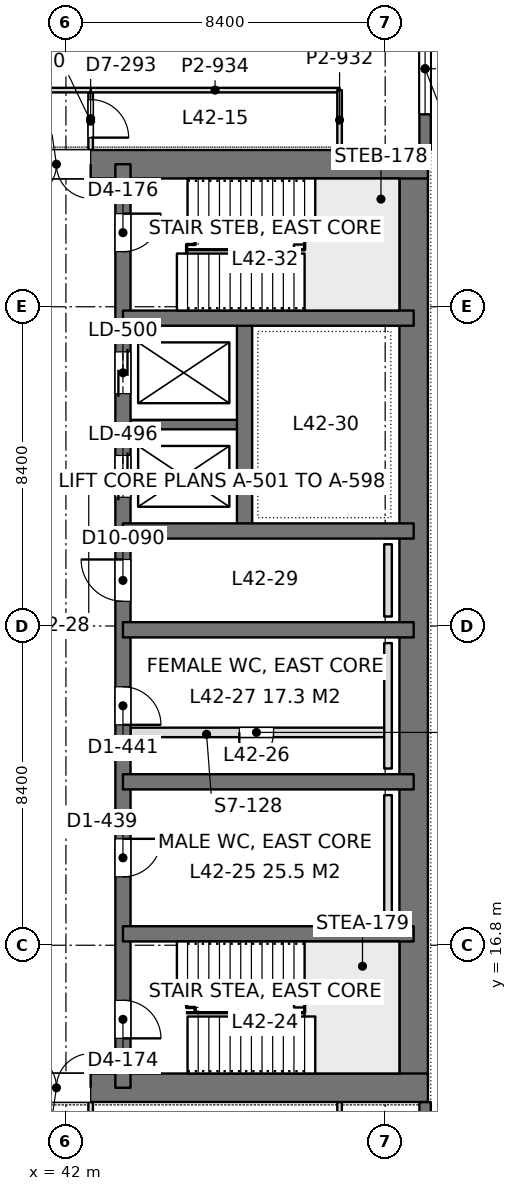
"""IFC4 building model, lengths in metres.
Left out: names, types, materials, properties, quantities, classifications, styles, units other than length and angle.
Written with IfcOpenShell. Run it as: python <this file> out.ifc"""

import sys

from ifc_helpers import new_model, si_unit, direction, frame, frame_2d, origin, place, context, subcontext, project, spatial, rectangle, extrude, element, fill, save


model = new_model("IFC4")
c1 = context("Model", 3, precision=1e-05, world=origin(), true_north=direction((0.0, 1.0)))
c2 = subcontext(c1, "Body", "Model", "MODEL_VIEW")
j1 = project(units=[si_unit("LENGTHUNIT", "METRE"), si_unit("PLANEANGLEUNIT", "RADIAN")], contexts=[c1])
p1 = place(None, origin())
s1 = spatial("IfcSite", under=j1, at=p1, CompositionType="ELEMENT")
p2 = place(p1, origin())
s2 = spatial("IfcBuilding", under=s1, at=p2, CompositionType="ELEMENT")
p3 = place(p2, frame((0.0, 0.0, 186.0)))
s3 = spatial("IfcBuildingStorey", under=s2, at=p3, CompositionType="ELEMENT", Elevation=186.0)
p4 = place(p3, frame((33.675, 13.05, 0.0), z_axis=(0.0, 0.0, 1.0), x_axis=(1.0, 0.0, 0.0)))
e1 = element("IfcWall", 1, at=p4, inside=s3, PredefinedType="SHEAR", context=c2, shape_type="SweptSolid", body=[
    extrude(rectangle(XDim=17.85, YDim=0.75, at=frame_2d((8.925, 0.0))), origin(), (0.0, 0.0, 1.0), 4.2),
])
p5 = place(p4, frame((7.175, 0.0, 0.0)))
e2 = element("IfcOpeningElement", 2, at=p5, cuts=e1, PredefinedType="OPENING", context=c2, shape_type="SweptSolid", body=[
    extrude(rectangle(XDim=1.8, YDim=2.4, at=frame_2d((0.9, 1.2))), frame((0.0, 0.385, 0.0), z_axis=(0.0, -1.0, 0.0), x_axis=(1.0, 0.0, 0.0)), (0.0, 0.0, 1.0), 0.77),
])
p6 = place(p3, frame((33.675, 37.35, 0.0), z_axis=(0.0, 0.0, 1.0), x_axis=(1.0, 0.0, 0.0)))
e3 = element("IfcWall", 3, at=p6, inside=s3, PredefinedType="SHEAR", context=c2, shape_type="SweptSolid", body=[
    extrude(rectangle(XDim=17.85, YDim=0.75, at=frame_2d((8.925, 0.0))), origin(), (0.0, 0.0, 1.0), 4.2),
])
p7 = place(p6, frame((7.175, 0.0, 0.0)))
e4 = element("IfcOpeningElement", 4, at=p7, cuts=e3, PredefinedType="OPENING", context=c2, shape_type="SweptSolid", body=[
    extrude(rectangle(XDim=1.8, YDim=2.4, at=frame_2d((0.9, 1.2))), frame((0.0, 0.385, 0.0), z_axis=(0.0, -1.0, 0.0), x_axis=(1.0, 0.0, 0.0)), (0.0, 0.0, 1.0), 0.77),
])
p8 = place(p3, frame((51.15, 13.05, 0.0), z_axis=(0.0, 0.0, 1.0), x_axis=(0.0, 1.0, 0.0)))
e5 = element("IfcWall", 5, at=p8, inside=s3, PredefinedType="SHEAR", context=c2, shape_type="SweptSolid", body=[
    extrude(rectangle(XDim=24.3, YDim=0.75, at=frame_2d((12.15, 0.0))), origin(), (0.0, 0.0, 1.0), 4.2),
])
p9 = place(p3, frame((43.5, 13.05, 0.0), z_axis=(0.0, 0.0, 1.0), x_axis=(0.0, 1.0, 0.0)))
e6 = element("IfcWall", 6, at=p9, inside=s3, PredefinedType="SHEAR", context=c2, shape_type="SweptSolid", body=[
    extrude(rectangle(XDim=24.3, YDim=0.4, at=frame_2d((12.15, 0.0))), origin(), (0.0, 0.0, 1.0), 4.2),
])
p10 = place(p9, frame((1.3, 0.0, 0.0)))
e7 = element("IfcOpeningElement", 7, at=p10, cuts=e6, PredefinedType="OPENING", context=c2, shape_type="SweptSolid", body=[
    extrude(rectangle(XDim=1.0, YDim=2.2, at=frame_2d((0.5, 1.1))), frame((0.0, 0.21, 0.0), z_axis=(0.0, -1.0, 0.0), x_axis=(1.0, 0.0, 0.0)), (0.0, 0.0, 1.0), 0.42),
])
p11 = place(p9, frame((22.0, 0.0, 0.0)))
e8 = element("IfcOpeningElement", 8, at=p11, cuts=e6, PredefinedType="OPENING", context=c2, shape_type="SweptSolid", body=[
    extrude(rectangle(XDim=1.0, YDim=2.2, at=frame_2d((0.5, 1.1))), frame((0.0, 0.21, 0.0), z_axis=(0.0, -1.0, 0.0), x_axis=(1.0, 0.0, 0.0)), (0.0, 0.0, 1.0), 0.42),
])
p12 = place(p9, frame((5.55, 0.0, 0.0)))
e9 = element("IfcOpeningElement", 9, at=p12, cuts=e6, PredefinedType="OPENING", context=c2, shape_type="SweptSolid", body=[
    extrude(rectangle(XDim=1.0, YDim=2.2, at=frame_2d((0.5, 1.1))), frame((0.0, 0.21, 0.0), z_axis=(0.0, -1.0, 0.0), x_axis=(1.0, 0.0, 0.0)), (0.0, 0.0, 1.0), 0.42),
])
p13 = place(p9, frame((9.55, 0.0, 0.0)))
e10 = element("IfcOpeningElement", 10, at=p13, cuts=e6, PredefinedType="OPENING", context=c2, shape_type="SweptSolid", body=[
    extrude(rectangle(XDim=1.0, YDim=2.2, at=frame_2d((0.5, 1.1))), frame((0.0, 0.21, 0.0), z_axis=(0.0, -1.0, 0.0), x_axis=(1.0, 0.0, 0.0)), (0.0, 0.0, 1.0), 0.42),
])
p14 = place(p9, frame((12.8, 0.0, 0.0)))
e11 = element("IfcOpeningElement", 11, at=p14, cuts=e6, PredefinedType="OPENING", context=c2, shape_type="SweptSolid", body=[
    extrude(rectangle(XDim=1.1, YDim=2.2, at=frame_2d((0.55, 1.1))), frame((0.0, 0.21, 0.0), z_axis=(0.0, -1.0, 0.0), x_axis=(1.0, 0.0, 0.0)), (0.0, 0.0, 1.0), 0.42),
])
p15 = place(p9, frame((15.538, 0.0, 0.0)))
e12 = element("IfcOpeningElement", 12, at=p15, cuts=e6, PredefinedType="OPENING", context=c2, shape_type="SweptSolid", body=[
    extrude(rectangle(XDim=1.1, YDim=2.2, at=frame_2d((0.55, 1.1))), frame((0.0, 0.21, 0.0), z_axis=(0.0, -1.0, 0.0), x_axis=(1.0, 0.0, 0.0)), (0.0, 0.0, 1.0), 0.42),
])
p16 = place(p9, frame((18.262, 0.0, 0.0)))
e13 = element("IfcOpeningElement", 13, at=p16, cuts=e6, PredefinedType="OPENING", context=c2, shape_type="SweptSolid", body=[
    extrude(rectangle(XDim=1.1, YDim=2.2, at=frame_2d((0.55, 1.1))), frame((0.0, 0.21, 0.0), z_axis=(0.0, -1.0, 0.0), x_axis=(1.0, 0.0, 0.0)), (0.0, 0.0, 1.0), 0.42),
])
for number, where, z_axis, x_axis in (
    (14, (51.15, 17.1, 0.0), (0.0, 0.0, 1.0), (-1.0, 0.0, 0.0)),
    (15, (51.15, 21.1, 0.0), (0.0, 0.0, 1.0), (-1.0, 0.0, 0.0)),
    (16, (51.15, 25.1, 0.0), (0.0, 0.0, 1.0), (-1.0, 0.0, 0.0)),
    (17, (51.15, 27.7, 0.0), (0.0, 0.0, 1.0), (-1.0, 0.0, 0.0)),
    (18, (51.15, 33.3, 0.0), (0.0, 0.0, 1.0), (-1.0, 0.0, 0.0)),
):
    element("IfcWall", number, at=place(p3, frame(where, z_axis=z_axis, x_axis=x_axis)), inside=s3, PredefinedType="SHEAR", context=c2, shape_type="SweptSolid", body=[
        extrude(rectangle(XDim=7.65, YDim=0.4, at=frame_2d((3.825, 0.0))), origin(), (0.0, 0.0, 1.0), 4.2),
    ])
p17 = place(p3, frame((46.7, 27.7, 0.0), z_axis=(0.0, 0.0, 1.0), x_axis=(0.0, 1.0, 0.0)))
e19 = element("IfcWall", 19, at=p17, inside=s3, PredefinedType="SHEAR", context=c2, shape_type="SweptSolid", body=[
    extrude(rectangle(XDim=5.6, YDim=0.4, at=frame_2d((2.8, 0.0))), origin(), (0.0, 0.0, 1.0), 4.2),
])
p18 = place(p3, frame((46.7, 30.5, 0.0), z_axis=(0.0, 0.0, 1.0), x_axis=(-1.0, 0.0, 0.0)))
e20 = element("IfcWall", 20, at=p18, inside=s3, PredefinedType="SHEAR", context=c2, shape_type="SweptSolid", body=[
    extrude(rectangle(XDim=3.2, YDim=0.25, at=frame_2d((1.6, 0.0))), origin(), (0.0, 0.0, 1.0), 4.2),
])
p19 = place(p3, frame((51.45, 42.0, 0.0), z_axis=(0.0, 0.0, 1.0), x_axis=(0.0, -1.0, 0.0)))
e21 = element("IfcWall", 21, at=p19, inside=s3, PredefinedType="SOLIDWALL", context=c2, shape_type="SweptSolid", body=[
    extrude(rectangle(XDim=4.275, YDim=0.3, at=frame_2d((2.137, 0.0))), origin(), (0.0, 0.0, 1.0), 4.05),
])
p20 = place(p19, frame((0.938, 0.0, 0.9)))
e22 = element("IfcOpeningElement", 22, at=p20, cuts=e21, PredefinedType="OPENING", context=c2, shape_type="SweptSolid", body=[
    extrude(rectangle(XDim=2.4, YDim=1.9, at=frame_2d((1.2, 0.95))), frame((0.0, 0.16, 0.0), z_axis=(0.0, -1.0, 0.0), x_axis=(1.0, 0.0, 0.0)), (0.0, 0.0, 1.0), 0.32),
])
p21 = place(p3, frame((51.45, 12.675, 0.0), z_axis=(0.0, 0.0, 1.0), x_axis=(0.0, -1.0, 0.0)))
e23 = element("IfcWall", 23, at=p21, inside=s3, PredefinedType="SOLIDWALL", context=c2, shape_type="SweptSolid", body=[
    extrude(rectangle(XDim=4.275, YDim=0.3, at=frame_2d((2.138, 0.0))), origin(), (0.0, 0.0, 1.0), 4.05),
])
p22 = place(p21, frame((0.938, 0.0, 0.9)))
e24 = element("IfcOpeningElement", 24, at=p22, cuts=e23, PredefinedType="OPENING", context=c2, shape_type="SweptSolid", body=[
    extrude(rectangle(XDim=2.4, YDim=1.9, at=frame_2d((1.2, 0.95))), frame((0.0, 0.16, 0.0), z_axis=(0.0, -1.0, 0.0), x_axis=(1.0, 0.0, 0.0)), (0.0, 0.0, 1.0), 0.32),
])
p23 = place(p3, frame((42.65, 11.158, 0.0), z_axis=(0.0, 0.0, 1.0), x_axis=(0.0, 1.0, 0.0)))
e25 = element("IfcWall", 25, at=p23, inside=s3, PredefinedType="PARTITIONING", context=c2, shape_type="SweptSolid", body=[
    extrude(rectangle(XDim=1.518, YDim=0.12, at=frame_2d((0.759, 0.0))), origin(), (0.0, 0.0, 1.0), 4.05),
])
p24 = place(p23, frame((0.192, 0.0, 0.0)))
e26 = element("IfcOpeningElement", 26, at=p24, cuts=e25, PredefinedType="OPENING", context=c2, shape_type="SweptSolid", body=[
    extrude(rectangle(XDim=1.0, YDim=2.4, at=frame_2d((0.5, 1.2))), frame((0.0, 0.07, 0.0), z_axis=(0.0, -1.0, 0.0), x_axis=(1.0, 0.0, 0.0)), (0.0, 0.0, 1.0), 0.14),
])
p25 = place(p3, frame((49.2, 11.1, 0.0), z_axis=(0.0, 0.0, 1.0), x_axis=(0.0, 1.0, 0.0)))
e27 = element("IfcWall", 27, at=p25, inside=s3, PredefinedType="PARTITIONING", context=c2, shape_type="SweptSolid", body=[
    extrude(rectangle(XDim=1.576, YDim=0.12, at=frame_2d((0.788, 0.0))), origin(), (0.0, 0.0, 1.0), 4.05),
])
p26 = place(p3, frame((1.2, 39.3, 0.0), z_axis=(0.0, 0.0, 1.0), x_axis=(1.0, 0.0, 0.0)))
e28 = element("IfcWall", 28, at=p26, inside=s3, PredefinedType="PARTITIONING", context=c2, shape_type="SweptSolid", body=[
    extrude(rectangle(XDim=41.452, YDim=0.12, at=frame_2d((20.726, 0.0))), origin(), (0.0, 0.0, 1.0), 3.55),
])
p27 = place(p26, frame((12.917, 0.0, 0.0)))
e29 = element("IfcOpeningElement", 29, at=p27, cuts=e28, PredefinedType="OPENING", context=c2, shape_type="SweptSolid", body=[
    extrude(rectangle(XDim=1.8, YDim=2.2, at=frame_2d((0.9, 1.1))), frame((0.0, 0.07, 0.0), z_axis=(0.0, -1.0, 0.0), x_axis=(1.0, 0.0, 0.0)), (0.0, 0.0, 1.0), 0.14),
])
p28 = place(p26, frame((26.733, 0.0, 0.0)))
e30 = element("IfcOpeningElement", 30, at=p28, cuts=e28, PredefinedType="OPENING", context=c2, shape_type="SweptSolid", body=[
    extrude(rectangle(XDim=1.8, YDim=2.2, at=frame_2d((0.9, 1.1))), frame((0.0, 0.07, 0.0), z_axis=(0.0, -1.0, 0.0), x_axis=(1.0, 0.0, 0.0)), (0.0, 0.0, 1.0), 0.14),
])
p29 = place(p3, frame((42.65, 37.724, 0.0), z_axis=(0.0, 0.0, 1.0), x_axis=(0.0, 1.0, 0.0)))
e31 = element("IfcWall", 31, at=p29, inside=s3, PredefinedType="PARTITIONING", context=c2, shape_type="SweptSolid", body=[
    extrude(rectangle(XDim=1.518, YDim=0.12, at=frame_2d((0.759, 0.0))), origin(), (0.0, 0.0, 1.0), 4.05),
])
p30 = place(p29, frame((0.326, 0.0, 0.0)))
e32 = element("IfcOpeningElement", 32, at=p30, cuts=e31, PredefinedType="OPENING", context=c2, shape_type="SweptSolid", body=[
    extrude(rectangle(XDim=1.0, YDim=2.4, at=frame_2d((0.5, 1.2))), frame((0.0, 0.07, 0.0), z_axis=(0.0, -1.0, 0.0), x_axis=(1.0, 0.0, 0.0)), (0.0, 0.0, 1.0), 0.14),
])
p31 = place(p3, frame((42.648, 39.3, 0.0), z_axis=(0.0, 0.0, 1.0), x_axis=(1.0, 0.0, 0.0)))
e33 = element("IfcWall", 33, at=p31, inside=s3, PredefinedType="PARTITIONING", context=c2, shape_type="SweptSolid", body=[
    extrude(rectangle(XDim=6.552, YDim=0.12, at=frame_2d((3.276, 0.0))), origin(), (0.0, 0.0, 1.0), 3.69),
])
p32 = place(p3, frame((49.2, 37.724, 0.0), z_axis=(0.0, 0.0, 1.0), x_axis=(0.0, 1.0, 0.0)))
e34 = element("IfcWall", 34, at=p32, inside=s3, PredefinedType="PARTITIONING", context=c2, shape_type="SweptSolid", body=[
    extrude(rectangle(XDim=1.576, YDim=0.12, at=frame_2d((0.788, 0.0))), origin(), (0.0, 0.0, 1.0), 4.05),
])
p33 = place(p3, frame((43.7, 22.4, 0.0), z_axis=(0.0, 0.0, 1.0), x_axis=(1.0, 0.0, 0.0)))
e35 = element("IfcWall", 35, at=p33, inside=s3, PredefinedType="PARTITIONING", context=c2, shape_type="SweptSolid", body=[
    extrude(rectangle(XDim=6.675, YDim=0.25, at=frame_2d((3.337, 0.0))), origin(), (0.0, 0.0, 1.0), 4.0),
])
p34 = place(p33, frame((2.863, 0.0, 0.0)))
e36 = element("IfcOpeningElement", 36, at=p34, cuts=e35, PredefinedType="OPENING", context=c2, shape_type="SweptSolid", body=[
    extrude(rectangle(XDim=0.9, YDim=2.2, at=frame_2d((0.45, 1.1))), frame((0.0, 0.135, 0.0), z_axis=(0.0, -1.0, 0.0), x_axis=(1.0, 0.0, 0.0)), (0.0, 0.0, 1.0), 0.27),
])
for number, where, z_axis, x_axis in (
    (37, (50.475, 17.45, 0.0), (0.0, 0.0, 1.0), (0.0, 1.0, 0.0)),
    (38, (50.475, 21.45, 0.0), (0.0, 0.0, 1.0), (0.0, 1.0, 0.0)),
):
    element("IfcWall", number, at=place(p3, frame(where, z_axis=z_axis, x_axis=x_axis)), inside=s3, PredefinedType="PLUMBINGWALL", context=c2, shape_type="SweptSolid", body=[
        extrude(rectangle(XDim=3.3, YDim=0.2, at=frame_2d((1.65, 0.0))), origin(), (0.0, 0.0, 1.0), 1.2),
    ])
p35 = place(p3, frame((50.475, 25.45, 0.0), z_axis=(0.0, 0.0, 1.0), x_axis=(0.0, 1.0, 0.0)))
e39 = element("IfcWall", 39, at=p35, inside=s3, PredefinedType="PLUMBINGWALL", context=c2, shape_type="SweptSolid", body=[
    extrude(rectangle(XDim=1.9, YDim=0.2, at=frame_2d((0.95, 0.0))), origin(), (0.0, 0.0, 1.0), 1.2),
])
p36 = place(p20, origin())
e40 = element("IfcWindow", 40, at=p36, inside=s3, PartitioningType="SINGLE_PANEL", PredefinedType="WINDOW", context=c2, shape_type="SweptSolid", body=[
    extrude(rectangle(XDim=2.4, YDim=1.9, at=frame_2d((1.2, 0.95))), frame((0.0, 0.03, 0.0), z_axis=(0.0, -1.0, 0.0), x_axis=(1.0, 0.0, 0.0)), (0.0, 0.0, 1.0), 0.06),
])
fill(e22, e40)
p37 = place(p5, origin())
e41 = element("IfcDoor", 41, at=p37, inside=s3, OperationType="DOUBLE_DOOR_SINGLE_SWING", PredefinedType="DOOR", context=c2, shape_type="SweptSolid", body=[
    extrude(rectangle(XDim=1.8, YDim=2.4, at=frame_2d((0.9, 1.2))), frame((0.0, 0.025, 0.0), z_axis=(0.0, -1.0, 0.0), x_axis=(1.0, 0.0, 0.0)), (0.0, 0.0, 1.0), 0.05),
])
fill(e2, e41)
p38 = place(p7, frame((1.8, 0.0, 0.0), z_axis=(0.0, 0.0, 1.0), x_axis=(-1.0, 0.0, 0.0)))
e42 = element("IfcDoor", 42, at=p38, inside=s3, OperationType="DOUBLE_DOOR_SINGLE_SWING", PredefinedType="DOOR", context=c2, shape_type="SweptSolid", body=[
    extrude(rectangle(XDim=1.8, YDim=2.4, at=frame_2d((0.9, 1.2))), frame((0.0, 0.025, 0.0), z_axis=(0.0, -1.0, 0.0), x_axis=(1.0, 0.0, 0.0)), (0.0, 0.0, 1.0), 0.05),
])
fill(e4, e42)
p39 = place(p10, frame((1.0, 0.0, 0.0), z_axis=(0.0, 0.0, 1.0), x_axis=(-1.0, 0.0, 0.0)))
e43 = element("IfcDoor", 43, at=p39, inside=s3, OperationType="SINGLE_SWING_RIGHT", PredefinedType="DOOR", context=c2, shape_type="SweptSolid", body=[
    extrude(rectangle(XDim=1.0, YDim=2.2, at=frame_2d((0.5, 1.1))), frame((0.0, 0.025, 0.0), z_axis=(0.0, -1.0, 0.0), x_axis=(1.0, 0.0, 0.0)), (0.0, 0.0, 1.0), 0.05),
])
fill(e7, e43)
p40 = place(p11, frame((1.0, 0.0, 0.0), z_axis=(0.0, 0.0, 1.0), x_axis=(-1.0, 0.0, 0.0)))
e44 = element("IfcDoor", 44, at=p40, inside=s3, OperationType="SINGLE_SWING_LEFT", PredefinedType="DOOR", context=c2, shape_type="SweptSolid", body=[
    extrude(rectangle(XDim=1.0, YDim=2.2, at=frame_2d((0.5, 1.1))), frame((0.0, 0.025, 0.0), z_axis=(0.0, -1.0, 0.0), x_axis=(1.0, 0.0, 0.0)), (0.0, 0.0, 1.0), 0.05),
])
fill(e8, e44)
p41 = place(p12, frame((1.0, 0.0, 0.0), z_axis=(0.0, 0.0, 1.0), x_axis=(-1.0, 0.0, 0.0)))
e45 = element("IfcDoor", 45, at=p41, inside=s3, OperationType="SINGLE_SWING_LEFT", PredefinedType="DOOR", context=c2, shape_type="SweptSolid", body=[
    extrude(rectangle(XDim=1.0, YDim=2.2, at=frame_2d((0.5, 1.1))), frame((0.0, 0.025, 0.0), z_axis=(0.0, -1.0, 0.0), x_axis=(1.0, 0.0, 0.0)), (0.0, 0.0, 1.0), 0.05),
])
fill(e9, e45)
p42 = place(p13, frame((1.0, 0.0, 0.0), z_axis=(0.0, 0.0, 1.0), x_axis=(-1.0, 0.0, 0.0)))
e46 = element("IfcDoor", 46, at=p42, inside=s3, OperationType="SINGLE_SWING_RIGHT", PredefinedType="DOOR", context=c2, shape_type="SweptSolid", body=[
    extrude(rectangle(XDim=1.0, YDim=2.2, at=frame_2d((0.5, 1.1))), frame((0.0, 0.025, 0.0), z_axis=(0.0, -1.0, 0.0), x_axis=(1.0, 0.0, 0.0)), (0.0, 0.0, 1.0), 0.05),
])
fill(e10, e46)
p43 = place(p14, origin())
e47 = element("IfcDoor", 47, at=p43, inside=s3, OperationType="SINGLE_SWING_RIGHT", PredefinedType="DOOR", context=c2, shape_type="SweptSolid", body=[
    extrude(rectangle(XDim=1.1, YDim=2.2, at=frame_2d((0.55, 1.1))), frame((0.0, 0.025, 0.0), z_axis=(0.0, -1.0, 0.0), x_axis=(1.0, 0.0, 0.0)), (0.0, 0.0, 1.0), 0.05),
])
fill(e11, e47)
p44 = place(p15, origin())
e48 = element("IfcDoor", 48, at=p44, inside=s3, OperationType="DOUBLE_DOOR_SLIDING", PredefinedType="DOOR", context=c2, shape_type="SweptSolid", body=[
    extrude(rectangle(XDim=1.1, YDim=2.2, at=frame_2d((0.55, 1.1))), frame((0.0, 0.025, 0.0), z_axis=(0.0, -1.0, 0.0), x_axis=(1.0, 0.0, 0.0)), (0.0, 0.0, 1.0), 0.05),
])
fill(e12, e48)
p45 = place(p16, origin())
e49 = element("IfcDoor", 49, at=p45, inside=s3, OperationType="DOUBLE_DOOR_SLIDING", PredefinedType="DOOR", context=c2, shape_type="SweptSolid", body=[
    extrude(rectangle(XDim=1.1, YDim=2.2, at=frame_2d((0.55, 1.1))), frame((0.0, 0.025, 0.0), z_axis=(0.0, -1.0, 0.0), x_axis=(1.0, 0.0, 0.0)), (0.0, 0.0, 1.0), 0.05),
])
fill(e13, e49)
p46 = place(p30, frame((1.0, 0.0, 0.0), z_axis=(0.0, 0.0, 1.0), x_axis=(-1.0, 0.0, 0.0)))
e50 = element("IfcDoor", 50, at=p46, inside=s3, OperationType="SINGLE_SWING_RIGHT", PredefinedType="DOOR", context=c2, shape_type="SweptSolid", body=[
    extrude(rectangle(XDim=1.0, YDim=2.4, at=frame_2d((0.5, 1.2))), frame((0.0, 0.025, 0.0), z_axis=(0.0, -1.0, 0.0), x_axis=(1.0, 0.0, 0.0)), (0.0, 0.0, 1.0), 0.05),
])
fill(e32, e50)
p47 = place(p34, frame((0.9, 0.0, 0.0), z_axis=(0.0, 0.0, 1.0), x_axis=(-1.0, 0.0, 0.0)))
e51 = element("IfcDoor", 51, at=p47, inside=s3, OperationType="SINGLE_SWING_RIGHT", PredefinedType="DOOR", context=c2, shape_type="SweptSolid", body=[
    extrude(rectangle(XDim=0.9, YDim=2.2, at=frame_2d((0.45, 1.1))), frame((0.0, 0.025, 0.0), z_axis=(0.0, -1.0, 0.0), x_axis=(1.0, 0.0, 0.0)), (0.0, 0.0, 1.0), 0.05),
])
fill(e36, e51)
save(model, sys.argv[1])
